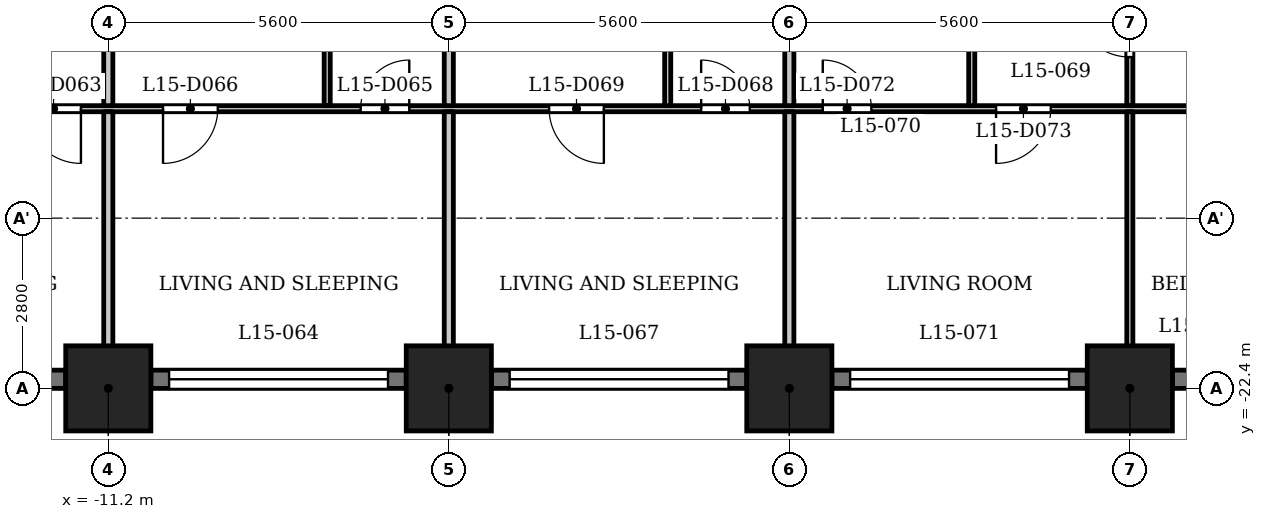
"""IFC4 building model, lengths in metres.
Left out: names, types, materials, properties, quantities, classifications, styles, units other than length and angle.
Written with IfcOpenShell. Run it as: python <this file> out.ifc"""

import sys

from ifc_helpers import new_model, si_unit, direction, frame, frame_2d, origin, origin_2d, place, context, subcontext, project, spatial, rectangle, extrude, element, fill, save


model = new_model("IFC4")
c1 = context("Model", 3, precision=1e-05, world=origin(), true_north=direction((0.0, 1.0)))
c2 = subcontext(c1, "Body", "Model", "MODEL_VIEW")
j1 = project(units=[si_unit("LENGTHUNIT", "METRE"), si_unit("PLANEANGLEUNIT", "RADIAN")], contexts=[c1])
p1 = place(None, origin())
s1 = spatial("IfcSite", under=j1, at=p1, CompositionType="ELEMENT")
p2 = place(p1, origin())
s2 = spatial("IfcBuilding", under=s1, at=p2, CompositionType="ELEMENT")
p3 = place(p2, frame((0.0, 0.0, 62.0)))
s3 = spatial("IfcBuildingStorey", under=s2, at=p3, CompositionType="ELEMENT", Elevation=62.0)
for number, where, z_axis, x_axis in (
    (1, (-11.2, -22.4, 0.0), (0.0, 0.0, 1.0), (1.0, 0.0, 0.0)),
    (2, (-5.6, -22.4, 0.0), (0.0, 0.0, 1.0), (1.0, 0.0, 0.0)),
    (3, (0.0, -22.4, 0.0), (0.0, 0.0, 1.0), (1.0, 0.0, 0.0)),
    (4, (5.6, -22.4, 0.0), (0.0, 0.0, 1.0), (1.0, 0.0, 0.0)),
):
    element("IfcColumn", number, at=place(p3, frame(where, z_axis=z_axis, x_axis=x_axis)), inside=s3, PredefinedType="COLUMN", context=c2, shape_type="SweptSolid", body=[
        extrude(rectangle(XDim=1.4, YDim=1.4, at=origin_2d()), origin(), (0.0, 0.0, 1.0), 3.5),
    ])
p4 = place(p3, frame((-16.1, -22.25, 0.0), z_axis=(0.0, 0.0, 1.0), x_axis=(1.0, 0.0, 0.0)))
e5 = element("IfcWall", 5, at=p4, inside=s3, PredefinedType="SOLIDWALL", context=c2, shape_type="SweptSolid", body=[
    extrude(rectangle(XDim=4.2, YDim=0.3, at=frame_2d((2.1, 0.0))), origin(), (0.0, 0.0, 1.0), 2.35),
])
p5 = place(p4, frame((0.3, 0.0, 1.2)))
e6 = element("IfcOpeningElement", 6, at=p5, cuts=e5, PredefinedType="OPENING", context=c2, shape_type="SweptSolid", body=[
    extrude(rectangle(XDim=3.6, YDim=0.95, at=frame_2d((1.8, 0.475))), frame((0.0, 0.16, 0.0), z_axis=(0.0, -1.0, 0.0), x_axis=(1.0, 0.0, 0.0)), (0.0, 0.0, 1.0), 0.32),
])
p6 = place(p3, frame((-10.5, -22.25, 0.0), z_axis=(0.0, 0.0, 1.0), x_axis=(1.0, 0.0, 0.0)))
e7 = element("IfcWall", 7, at=p6, inside=s3, PredefinedType="SOLIDWALL", context=c2, shape_type="SweptSolid", body=[
    extrude(rectangle(XDim=4.2, YDim=0.3, at=frame_2d((2.1, 0.0))), origin(), (0.0, 0.0, 1.0), 2.35),
])
p7 = place(p6, frame((0.3, 0.0, 1.2)))
e8 = element("IfcOpeningElement", 8, at=p7, cuts=e7, PredefinedType="OPENING", context=c2, shape_type="SweptSolid", body=[
    extrude(rectangle(XDim=3.6, YDim=0.95, at=frame_2d((1.8, 0.475))), frame((0.0, 0.16, 0.0), z_axis=(0.0, -1.0, 0.0), x_axis=(1.0, 0.0, 0.0)), (0.0, 0.0, 1.0), 0.32),
])
p8 = place(p3, frame((-4.9, -22.25, 0.0), z_axis=(0.0, 0.0, 1.0), x_axis=(1.0, 0.0, 0.0)))
e9 = element("IfcWall", 9, at=p8, inside=s3, PredefinedType="SOLIDWALL", context=c2, shape_type="SweptSolid", body=[
    extrude(rectangle(XDim=4.2, YDim=0.3, at=frame_2d((2.1, 0.0))), origin(), (0.0, 0.0, 1.0), 2.35),
])
p9 = place(p8, frame((0.3, 0.0, 1.2)))
e10 = element("IfcOpeningElement", 10, at=p9, cuts=e9, PredefinedType="OPENING", context=c2, shape_type="SweptSolid", body=[
    extrude(rectangle(XDim=3.6, YDim=0.95, at=frame_2d((1.8, 0.475))), frame((0.0, 0.16, 0.0), z_axis=(0.0, -1.0, 0.0), x_axis=(1.0, 0.0, 0.0)), (0.0, 0.0, 1.0), 0.32),
])
p10 = place(p3, frame((0.7, -22.25, 0.0), z_axis=(0.0, 0.0, 1.0), x_axis=(1.0, 0.0, 0.0)))
e11 = element("IfcWall", 11, at=p10, inside=s3, PredefinedType="SOLIDWALL", context=c2, shape_type="SweptSolid", body=[
    extrude(rectangle(XDim=4.2, YDim=0.3, at=frame_2d((2.1, 0.0))), origin(), (0.0, 0.0, 1.0), 2.35),
])
p11 = place(p10, frame((0.3, 0.0, 1.2)))
e12 = element("IfcOpeningElement", 12, at=p11, cuts=e11, PredefinedType="OPENING", context=c2, shape_type="SweptSolid", body=[
    extrude(rectangle(XDim=3.6, YDim=0.95, at=frame_2d((1.8, 0.475))), frame((0.0, 0.16, 0.0), z_axis=(0.0, -1.0, 0.0), x_axis=(1.0, 0.0, 0.0)), (0.0, 0.0, 1.0), 0.32),
])
p12 = place(p3, frame((6.3, -22.25, 0.0), z_axis=(0.0, 0.0, 1.0), x_axis=(1.0, 0.0, 0.0)))
e13 = element("IfcWall", 13, at=p12, inside=s3, PredefinedType="SOLIDWALL", context=c2, shape_type="SweptSolid", body=[
    extrude(rectangle(XDim=4.2, YDim=0.3, at=frame_2d((2.1, 0.0))), origin(), (0.0, 0.0, 1.0), 2.35),
])
p13 = place(p12, frame((0.413, 0.0, 0.6)))
e14 = element("IfcOpeningElement", 14, at=p13, cuts=e13, PredefinedType="OPENING", context=c2, shape_type="SweptSolid", body=[
    extrude(rectangle(XDim=1.2, YDim=1.55, at=frame_2d((0.6, 0.775))), frame((0.0, 0.16, 0.0), z_axis=(0.0, -1.0, 0.0), x_axis=(1.0, 0.0, 0.0)), (0.0, 0.0, 1.0), 0.32),
])
p14 = place(p12, frame((2.587, 0.0, 0.6)))
e15 = element("IfcOpeningElement", 15, at=p14, cuts=e13, PredefinedType="OPENING", context=c2, shape_type="SweptSolid", body=[
    extrude(rectangle(XDim=1.2, YDim=1.55, at=frame_2d((0.6, 0.775))), frame((0.0, 0.16, 0.0), z_axis=(0.0, -1.0, 0.0), x_axis=(1.0, 0.0, 0.0)), (0.0, 0.0, 1.0), 0.32),
])
p15 = place(p3, frame((-26.394, -17.8, 0.0), z_axis=(0.0, 0.0, 1.0), x_axis=(1.0, 0.0, 0.0)))
e16 = element("IfcWall", 16, at=p15, inside=s3, PredefinedType="PARTITIONING", context=c2, shape_type="SweptSolid", body=[
    extrude(rectangle(XDim=53.034, YDim=0.1, at=frame_2d((26.517, 0.0))), origin(), (0.0, 0.0, 1.0), 3.2),
])
p16 = place(p15, frame((0.794, 0.0, 0.0)))
e17 = element("IfcOpeningElement", 17, at=p16, cuts=e16, PredefinedType="OPENING", context=c2, shape_type="SweptSolid", body=[
    extrude(rectangle(XDim=0.8, YDim=2.1, at=frame_2d((0.4, 1.05))), frame((0.0, 0.06, 0.0), z_axis=(0.0, -1.0, 0.0), x_axis=(1.0, 0.0, 0.0)), (0.0, 0.0, 1.0), 0.12),
])
p17 = place(p15, frame((5.644, 0.0, 0.0)))
e18 = element("IfcOpeningElement", 18, at=p17, cuts=e16, PredefinedType="OPENING", context=c2, shape_type="SweptSolid", body=[
    extrude(rectangle(XDim=0.9, YDim=2.1, at=frame_2d((0.45, 1.05))), frame((0.0, 0.06, 0.0), z_axis=(0.0, -1.0, 0.0), x_axis=(1.0, 0.0, 0.0)), (0.0, 0.0, 1.0), 0.12),
])
p18 = place(p15, frame((10.494, 0.0, 0.0)))
e19 = element("IfcOpeningElement", 19, at=p18, cuts=e16, PredefinedType="OPENING", context=c2, shape_type="SweptSolid", body=[
    extrude(rectangle(XDim=0.8, YDim=2.1, at=frame_2d((0.4, 1.05))), frame((0.0, 0.06, 0.0), z_axis=(0.0, -1.0, 0.0), x_axis=(1.0, 0.0, 0.0)), (0.0, 0.0, 1.0), 0.12),
])
p19 = place(p15, frame((13.844, 0.0, 0.0)))
e20 = element("IfcOpeningElement", 20, at=p19, cuts=e16, PredefinedType="OPENING", context=c2, shape_type="SweptSolid", body=[
    extrude(rectangle(XDim=0.9, YDim=2.1, at=frame_2d((0.45, 1.05))), frame((0.0, 0.06, 0.0), z_axis=(0.0, -1.0, 0.0), x_axis=(1.0, 0.0, 0.0)), (0.0, 0.0, 1.0), 0.12),
])
p20 = place(p15, frame((19.344, 0.0, 0.0)))
e21 = element("IfcOpeningElement", 21, at=p20, cuts=e16, PredefinedType="OPENING", context=c2, shape_type="SweptSolid", body=[
    extrude(rectangle(XDim=0.8, YDim=2.1, at=frame_2d((0.4, 1.05))), frame((0.0, 0.06, 0.0), z_axis=(0.0, -1.0, 0.0), x_axis=(1.0, 0.0, 0.0)), (0.0, 0.0, 1.0), 0.12),
])
p21 = place(p15, frame((16.094, 0.0, 0.0)))
e22 = element("IfcOpeningElement", 22, at=p21, cuts=e16, PredefinedType="OPENING", context=c2, shape_type="SweptSolid", body=[
    extrude(rectangle(XDim=0.9, YDim=2.1, at=frame_2d((0.45, 1.05))), frame((0.0, 0.06, 0.0), z_axis=(0.0, -1.0, 0.0), x_axis=(1.0, 0.0, 0.0)), (0.0, 0.0, 1.0), 0.12),
])
p22 = place(p15, frame((24.944, 0.0, 0.0)))
e23 = element("IfcOpeningElement", 23, at=p22, cuts=e16, PredefinedType="OPENING", context=c2, shape_type="SweptSolid", body=[
    extrude(rectangle(XDim=0.8, YDim=2.1, at=frame_2d((0.4, 1.05))), frame((0.0, 0.06, 0.0), z_axis=(0.0, -1.0, 0.0), x_axis=(1.0, 0.0, 0.0)), (0.0, 0.0, 1.0), 0.12),
])
p23 = place(p15, frame((22.444, 0.0, 0.0)))
e24 = element("IfcOpeningElement", 24, at=p23, cuts=e16, PredefinedType="OPENING", context=c2, shape_type="SweptSolid", body=[
    extrude(rectangle(XDim=0.9, YDim=2.1, at=frame_2d((0.45, 1.05))), frame((0.0, 0.06, 0.0), z_axis=(0.0, -1.0, 0.0), x_axis=(1.0, 0.0, 0.0)), (0.0, 0.0, 1.0), 0.12),
])
p24 = place(p15, frame((26.944, 0.0, 0.0)))
e25 = element("IfcOpeningElement", 25, at=p24, cuts=e16, PredefinedType="OPENING", context=c2, shape_type="SweptSolid", body=[
    extrude(rectangle(XDim=0.8, YDim=2.1, at=frame_2d((0.4, 1.05))), frame((0.0, 0.06, 0.0), z_axis=(0.0, -1.0, 0.0), x_axis=(1.0, 0.0, 0.0)), (0.0, 0.0, 1.0), 0.12),
])
p25 = place(p15, frame((29.794, 0.0, 0.0)))
e26 = element("IfcOpeningElement", 26, at=p25, cuts=e16, PredefinedType="OPENING", context=c2, shape_type="SweptSolid", body=[
    extrude(rectangle(XDim=0.9, YDim=2.1, at=frame_2d((0.45, 1.05))), frame((0.0, 0.06, 0.0), z_axis=(0.0, -1.0, 0.0), x_axis=(1.0, 0.0, 0.0)), (0.0, 0.0, 1.0), 0.12),
])
p26 = place(p15, frame((33.394, 0.0, 0.0)))
e27 = element("IfcOpeningElement", 27, at=p26, cuts=e16, PredefinedType="OPENING", context=c2, shape_type="SweptSolid", body=[
    extrude(rectangle(XDim=0.9, YDim=2.1, at=frame_2d((0.45, 1.05))), frame((0.0, 0.06, 0.0), z_axis=(0.0, -1.0, 0.0), x_axis=(1.0, 0.0, 0.0)), (0.0, 0.0, 1.0), 0.12),
])
p27 = place(p15, frame((34.944, 0.0, 0.0)))
e28 = element("IfcOpeningElement", 28, at=p27, cuts=e16, PredefinedType="OPENING", context=c2, shape_type="SweptSolid", body=[
    extrude(rectangle(XDim=0.9, YDim=2.1, at=frame_2d((0.45, 1.05))), frame((0.0, 0.06, 0.0), z_axis=(0.0, -1.0, 0.0), x_axis=(1.0, 0.0, 0.0)), (0.0, 0.0, 1.0), 0.12),
])
p28 = place(p15, frame((38.144, 0.0, 0.0)))
e29 = element("IfcOpeningElement", 29, at=p28, cuts=e16, PredefinedType="OPENING", context=c2, shape_type="SweptSolid", body=[
    extrude(rectangle(XDim=0.8, YDim=2.1, at=frame_2d((0.4, 1.05))), frame((0.0, 0.06, 0.0), z_axis=(0.0, -1.0, 0.0), x_axis=(1.0, 0.0, 0.0)), (0.0, 0.0, 1.0), 0.12),
])
p29 = place(p15, frame((40.244, 0.0, 0.0)))
e30 = element("IfcOpeningElement", 30, at=p29, cuts=e16, PredefinedType="OPENING", context=c2, shape_type="SweptSolid", body=[
    extrude(rectangle(XDim=0.9, YDim=2.1, at=frame_2d((0.45, 1.05))), frame((0.0, 0.06, 0.0), z_axis=(0.0, -1.0, 0.0), x_axis=(1.0, 0.0, 0.0)), (0.0, 0.0, 1.0), 0.12),
])
p30 = place(p15, frame((49.362, 0.0, 0.0)))
e31 = element("IfcOpeningElement", 31, at=p30, cuts=e16, PredefinedType="OPENING", context=c2, shape_type="SweptSolid", body=[
    extrude(rectangle(XDim=0.8, YDim=2.1, at=frame_2d((0.4, 1.05))), frame((0.0, 0.06, 0.0), z_axis=(0.0, -1.0, 0.0), x_axis=(1.0, 0.0, 0.0)), (0.0, 0.0, 1.0), 0.12),
])
p31 = place(p15, frame((45.094, 0.0, 0.0)))
e32 = element("IfcOpeningElement", 32, at=p31, cuts=e16, PredefinedType="OPENING", context=c2, shape_type="SweptSolid", body=[
    extrude(rectangle(XDim=0.9, YDim=2.1, at=frame_2d((0.45, 1.05))), frame((0.0, 0.06, 0.0), z_axis=(0.0, -1.0, 0.0), x_axis=(1.0, 0.0, 0.0)), (0.0, 0.0, 1.0), 0.12),
])
p32 = place(p3, frame((-11.2, -23.08, 0.0), z_axis=(0.0, 0.0, 1.0), x_axis=(0.0, 1.0, 0.0)))
e33 = element("IfcWall", 33, at=p32, inside=s3, PredefinedType="PARTITIONING", context=c2, shape_type="SweptSolid", body=[
    extrude(rectangle(XDim=5.23, YDim=0.15, at=frame_2d((2.615, 0.0))), origin(), (0.0, 0.0, 1.0), 3.2),
])
p33 = place(p3, frame((-11.2, -17.75, 0.0), z_axis=(0.0, 0.0, 1.0), x_axis=(0.0, 1.0, 0.0)))
e34 = element("IfcWall", 34, at=p33, inside=s3, PredefinedType="PARTITIONING", context=c2, shape_type="SweptSolid", body=[
    extrude(rectangle(XDim=2.275, YDim=0.15, at=frame_2d((1.137, 0.0))), origin(), (0.0, 0.0, 1.0), 3.2),
])
p34 = place(p3, frame((-7.6, -17.75, 0.0), z_axis=(0.0, 0.0, 1.0), x_axis=(0.0, 1.0, 0.0)))
e35 = element("IfcWall", 35, at=p34, inside=s3, PredefinedType="PARTITIONING", context=c2, shape_type="SweptSolid", body=[
    extrude(rectangle(XDim=2.275, YDim=0.1, at=frame_2d((1.137, 0.0))), origin(), (0.0, 0.0, 1.0), 3.2),
])
p35 = place(p3, frame((-5.6, -23.08, 0.0), z_axis=(0.0, 0.0, 1.0), x_axis=(0.0, 1.0, 0.0)))
e36 = element("IfcWall", 36, at=p35, inside=s3, PredefinedType="PARTITIONING", context=c2, shape_type="SweptSolid", body=[
    extrude(rectangle(XDim=5.23, YDim=0.15, at=frame_2d((2.615, 0.0))), origin(), (0.0, 0.0, 1.0), 3.2),
])
p36 = place(p3, frame((-5.6, -17.75, 0.0), z_axis=(0.0, 0.0, 1.0), x_axis=(0.0, 1.0, 0.0)))
e37 = element("IfcWall", 37, at=p36, inside=s3, PredefinedType="PARTITIONING", context=c2, shape_type="SweptSolid", body=[
    extrude(rectangle(XDim=2.275, YDim=0.15, at=frame_2d((1.137, 0.0))), origin(), (0.0, 0.0, 1.0), 3.2),
])
p37 = place(p3, frame((-2.0, -17.75, 0.0), z_axis=(0.0, 0.0, 1.0), x_axis=(0.0, 1.0, 0.0)))
e38 = element("IfcWall", 38, at=p37, inside=s3, PredefinedType="PARTITIONING", context=c2, shape_type="SweptSolid", body=[
    extrude(rectangle(XDim=2.275, YDim=0.1, at=frame_2d((1.137, 0.0))), origin(), (0.0, 0.0, 1.0), 3.2),
])
p38 = place(p3, frame((0.0, -23.08, 0.0), z_axis=(0.0, 0.0, 1.0), x_axis=(0.0, 1.0, 0.0)))
e39 = element("IfcWall", 39, at=p38, inside=s3, PredefinedType="PARTITIONING", context=c2, shape_type="SweptSolid", body=[
    extrude(rectangle(XDim=5.23, YDim=0.15, at=frame_2d((2.615, 0.0))), origin(), (0.0, 0.0, 1.0), 3.2),
])
p39 = place(p3, frame((0.0, -17.75, 0.0), z_axis=(0.0, 0.0, 1.0), x_axis=(0.0, 1.0, 0.0)))
e40 = element("IfcWall", 40, at=p39, inside=s3, PredefinedType="PARTITIONING", context=c2, shape_type="SweptSolid", body=[
    extrude(rectangle(XDim=2.275, YDim=0.15, at=frame_2d((1.137, 0.0))), origin(), (0.0, 0.0, 1.0), 3.2),
])
p40 = place(p3, frame((3.0, -17.75, 0.0), z_axis=(0.0, 0.0, 1.0), x_axis=(0.0, 1.0, 0.0)))
e41 = element("IfcWall", 41, at=p40, inside=s3, PredefinedType="PARTITIONING", context=c2, shape_type="SweptSolid", body=[
    extrude(rectangle(XDim=2.275, YDim=0.1, at=frame_2d((1.137, 0.0))), origin(), (0.0, 0.0, 1.0), 3.2),
])
p41 = place(p3, frame((5.6, -23.08, 0.0), z_axis=(0.0, 0.0, 1.0), x_axis=(0.0, 1.0, 0.0)))
e42 = element("IfcWall", 42, at=p41, inside=s3, PredefinedType="PARTITIONING", context=c2, shape_type="SweptSolid", body=[
    extrude(rectangle(XDim=5.23, YDim=0.1, at=frame_2d((2.615, 0.0))), origin(), (0.0, 0.0, 1.0), 3.2),
])
p42 = place(p3, frame((5.6, -17.75, 0.0), z_axis=(0.0, 0.0, 1.0), x_axis=(0.0, 1.0, 0.0)))
e43 = element("IfcWall", 43, at=p42, inside=s3, PredefinedType="PARTITIONING", context=c2, shape_type="SweptSolid", body=[
    extrude(rectangle(XDim=2.275, YDim=0.1, at=frame_2d((1.137, 0.0))), origin(), (0.0, 0.0, 1.0), 3.2),
])
p43 = place(p42, frame((0.799, 0.0, 0.0)))
e44 = element("IfcOpeningElement", 44, at=p43, cuts=e43, PredefinedType="OPENING", context=c2, shape_type="SweptSolid", body=[
    extrude(rectangle(XDim=0.9, YDim=2.1, at=frame_2d((0.45, 1.05))), frame((0.0, 0.06, 0.0), z_axis=(0.0, -1.0, 0.0), x_axis=(1.0, 0.0, 0.0)), (0.0, 0.0, 1.0), 0.12),
])
p44 = place(p19, origin())
e45 = element("IfcDoor", 45, at=p44, inside=s3, OperationType="SINGLE_SWING_RIGHT", PredefinedType="DOOR", context=c2, shape_type="SweptSolid", body=[
    extrude(rectangle(XDim=0.9, YDim=2.1, at=frame_2d((0.45, 1.05))), frame((0.0, 0.025, 0.0), z_axis=(0.0, -1.0, 0.0), x_axis=(1.0, 0.0, 0.0)), (0.0, 0.0, 1.0), 0.05),
])
fill(e20, e45)
p45 = place(p20, origin())
e46 = element("IfcDoor", 46, at=p45, inside=s3, OperationType="SINGLE_SWING_LEFT", PredefinedType="DOOR", context=c2, shape_type="SweptSolid", body=[
    extrude(rectangle(XDim=0.8, YDim=2.1, at=frame_2d((0.4, 1.05))), frame((0.0, 0.025, 0.0), z_axis=(0.0, -1.0, 0.0), x_axis=(1.0, 0.0, 0.0)), (0.0, 0.0, 1.0), 0.05),
])
fill(e21, e46)
p46 = place(p21, origin())
e47 = element("IfcDoor", 47, at=p46, inside=s3, OperationType="SINGLE_SWING_LEFT", PredefinedType="DOOR", context=c2, shape_type="SweptSolid", body=[
    extrude(rectangle(XDim=0.9, YDim=2.1, at=frame_2d((0.45, 1.05))), frame((0.0, 0.025, 0.0), z_axis=(0.0, -1.0, 0.0), x_axis=(1.0, 0.0, 0.0)), (0.0, 0.0, 1.0), 0.05),
])
fill(e22, e47)
p47 = place(p22, origin())
e48 = element("IfcDoor", 48, at=p47, inside=s3, OperationType="SINGLE_SWING_RIGHT", PredefinedType="DOOR", context=c2, shape_type="SweptSolid", body=[
    extrude(rectangle(XDim=0.8, YDim=2.1, at=frame_2d((0.4, 1.05))), frame((0.0, 0.025, 0.0), z_axis=(0.0, -1.0, 0.0), x_axis=(1.0, 0.0, 0.0)), (0.0, 0.0, 1.0), 0.05),
])
fill(e23, e48)
p48 = place(p23, origin())
e49 = element("IfcDoor", 49, at=p48, inside=s3, OperationType="SINGLE_SWING_RIGHT", PredefinedType="DOOR", context=c2, shape_type="SweptSolid", body=[
    extrude(rectangle(XDim=0.9, YDim=2.1, at=frame_2d((0.45, 1.05))), frame((0.0, 0.025, 0.0), z_axis=(0.0, -1.0, 0.0), x_axis=(1.0, 0.0, 0.0)), (0.0, 0.0, 1.0), 0.05),
])
fill(e24, e49)
p49 = place(p43, origin())
e50 = element("IfcDoor", 50, at=p49, inside=s3, OperationType="SINGLE_SWING_LEFT", PredefinedType="DOOR", context=c2, shape_type="SweptSolid", body=[
    extrude(rectangle(XDim=0.9, YDim=2.1, at=frame_2d((0.45, 1.05))), frame((0.0, 0.025, 0.0), z_axis=(0.0, -1.0, 0.0), x_axis=(1.0, 0.0, 0.0)), (0.0, 0.0, 1.0), 0.05),
])
fill(e44, e50)
p50 = place(p24, origin())
e51 = element("IfcDoor", 51, at=p50, inside=s3, OperationType="SINGLE_SWING_RIGHT", PredefinedType="DOOR", context=c2, shape_type="SweptSolid", body=[
    extrude(rectangle(XDim=0.8, YDim=2.1, at=frame_2d((0.4, 1.05))), frame((0.0, 0.025, 0.0), z_axis=(0.0, -1.0, 0.0), x_axis=(1.0, 0.0, 0.0)), (0.0, 0.0, 1.0), 0.05),
])
fill(e25, e51)
p51 = place(p25, origin())
e52 = element("IfcDoor", 52, at=p51, inside=s3, OperationType="SINGLE_SWING_LEFT", PredefinedType="DOOR", context=c2, shape_type="SweptSolid", body=[
    extrude(rectangle(XDim=0.9, YDim=2.1, at=frame_2d((0.45, 1.05))), frame((0.0, 0.025, 0.0), z_axis=(0.0, -1.0, 0.0), x_axis=(1.0, 0.0, 0.0)), (0.0, 0.0, 1.0), 0.05),
])
fill(e26, e52)
p52 = place(p7, origin())
e53 = element("IfcWindow", 53, at=p52, inside=s3, PartitioningType="SINGLE_PANEL", PredefinedType="WINDOW", context=c2, shape_type="SweptSolid", body=[
    extrude(rectangle(XDim=3.6, YDim=0.95, at=frame_2d((1.8, 0.475))), frame((0.0, 0.03, 0.0), z_axis=(0.0, -1.0, 0.0), x_axis=(1.0, 0.0, 0.0)), (0.0, 0.0, 1.0), 0.06),
])
fill(e8, e53)
p53 = place(p9, origin())
e54 = element("IfcWindow", 54, at=p53, inside=s3, PartitioningType="SINGLE_PANEL", PredefinedType="WINDOW", context=c2, shape_type="SweptSolid", body=[
    extrude(rectangle(XDim=3.6, YDim=0.95, at=frame_2d((1.8, 0.475))), frame((0.0, 0.03, 0.0), z_axis=(0.0, -1.0, 0.0), x_axis=(1.0, 0.0, 0.0)), (0.0, 0.0, 1.0), 0.06),
])
fill(e10, e54)
p54 = place(p11, origin())
e55 = element("IfcWindow", 55, at=p54, inside=s3, PartitioningType="SINGLE_PANEL", PredefinedType="WINDOW", context=c2, shape_type="SweptSolid", body=[
    extrude(rectangle(XDim=3.6, YDim=0.95, at=frame_2d((1.8, 0.475))), frame((0.0, 0.03, 0.0), z_axis=(0.0, -1.0, 0.0), x_axis=(1.0, 0.0, 0.0)), (0.0, 0.0, 1.0), 0.06),
])
fill(e12, e55)
save(model, sys.argv[1])
